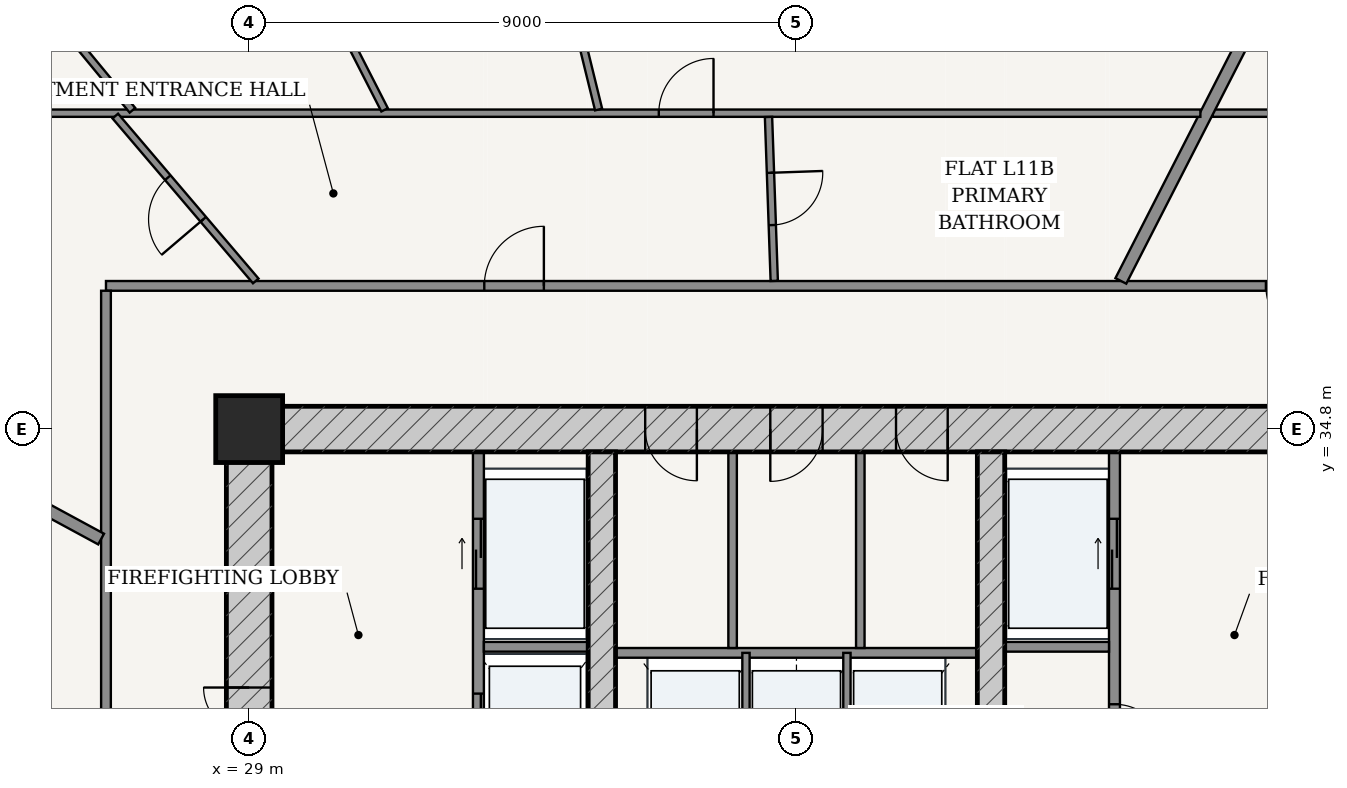
"""IFC4 building model, lengths in metres.
Left out: names, types, materials, properties, quantities, classifications, styles, units other than length and angle.
Written with IfcOpenShell. Run it as: python <this file> out.ifc"""

import sys

from ifc_helpers import new_model, si_unit, direction, frame, frame_2d, origin, origin_2d, place, context, subcontext, project, spatial, rectangle, extrude, source, transform, mapped, element, fill, save


model = new_model("IFC4")
c1 = context("Model", 3, precision=1e-05, world=origin(), true_north=direction((-0.2419218956, 0.970295726276)))
c2 = subcontext(c1, "Body", "Model", "MODEL_VIEW")
j1 = project(units=[si_unit("LENGTHUNIT", "METRE"), si_unit("PLANEANGLEUNIT", "RADIAN")], contexts=[c1])
p1 = place(None, origin())
s1 = spatial("IfcSite", under=j1, at=p1, CompositionType="ELEMENT")
p2 = place(p1, origin())
s2 = spatial("IfcBuilding", under=s1, at=p2, CompositionType="ELEMENT")
p3 = place(p2, frame((0.0, 0.0, 45.6)))
s3 = spatial("IfcBuildingStorey", under=s2, at=p3, CompositionType="ELEMENT", Elevation=45.6)
p4 = place(p3, frame((29.0, 34.8, 0.0), z_axis=(0.0, 0.0, 1.0), x_axis=(1.0, 0.0, 0.0)))
e1 = element("IfcColumn", 1, at=p4, inside=s3, PredefinedType="COLUMN", context=c2, shape_type="SweptSolid", body=[
    extrude(rectangle(XDim=1.1, YDim=1.1, at=origin_2d()), origin(), (0.0, 0.0, 1.0), 3.6),
])
p5 = place(p3, frame((28.625, 34.8, 0.0), z_axis=(0.0, 0.0, 1.0), x_axis=(1.0, 0.0, 0.0)))
e2 = element("IfcWall", 2, at=p5, inside=s3, PredefinedType="SHEAR", context=c2, shape_type="SweptSolid", body=[
    extrude(rectangle(XDim=18.75, YDim=0.75, at=frame_2d((9.375, 0.0))), origin(), (0.0, 0.0, 1.0), 3.32),
])
p6 = place(p5, frame((6.887, 0.0, 0.0)))
e3 = element("IfcOpeningElement", 3, at=p6, cuts=e2, PredefinedType="OPENING", context=c2, shape_type="SweptSolid", body=[
    extrude(rectangle(XDim=0.85, YDim=2.1, at=frame_2d((0.425, 1.05))), frame((0.0, 0.385, 0.0), z_axis=(0.0, -1.0, 0.0), x_axis=(1.0, 0.0, 0.0)), (0.0, 0.0, 1.0), 0.77),
])
p7 = place(p5, frame((8.945, 0.0, 0.0)))
e4 = element("IfcOpeningElement", 4, at=p7, cuts=e2, PredefinedType="OPENING", context=c2, shape_type="SweptSolid", body=[
    extrude(rectangle(XDim=0.86, YDim=2.1, at=frame_2d((0.43, 1.05))), frame((0.0, 0.385, 0.0), z_axis=(0.0, -1.0, 0.0), x_axis=(1.0, 0.0, 0.0)), (0.0, 0.0, 1.0), 0.77),
])
p8 = place(p5, frame((11.012, 0.0, 0.0)))
e5 = element("IfcOpeningElement", 5, at=p8, cuts=e2, PredefinedType="OPENING", context=c2, shape_type="SweptSolid", body=[
    extrude(rectangle(XDim=0.85, YDim=2.1, at=frame_2d((0.425, 1.05))), frame((0.0, 0.385, 0.0), z_axis=(0.0, -1.0, 0.0), x_axis=(1.0, 0.0, 0.0)), (0.0, 0.0, 1.0), 0.77),
])
p9 = place(p3, frame((29.0, 19.175, 0.0), z_axis=(0.0, 0.0, 1.0), x_axis=(0.0, 1.0, 0.0)))
e6 = element("IfcWall", 6, at=p9, inside=s3, PredefinedType="SHEAR", context=c2, shape_type="SweptSolid", body=[
    extrude(rectangle(XDim=15.25, YDim=0.75, at=frame_2d((7.625, 0.0))), origin(), (0.0, 0.0, 1.0), 3.32),
])
p10 = place(p9, frame((9.875, 0.0, 0.0)))
e7 = element("IfcOpeningElement", 7, at=p10, cuts=e6, PredefinedType="OPENING", context=c2, shape_type="SweptSolid", body=[
    extrude(rectangle(XDim=1.5, YDim=2.2, at=frame_2d((0.75, 1.1))), frame((0.0, 0.385, 0.0), z_axis=(0.0, -1.0, 0.0), x_axis=(1.0, 0.0, 0.0)), (0.0, 0.0, 1.0), 0.77),
])
p11 = place(p3, frame((34.8, 19.175, 0.0), z_axis=(0.0, 0.0, 1.0), x_axis=(0.0, 1.0, 0.0)))
e8 = element("IfcWall", 8, at=p11, inside=s3, PredefinedType="SHEAR", context=c2, shape_type="SweptSolid", body=[
    extrude(rectangle(XDim=15.25, YDim=0.45, at=frame_2d((7.625, 0.0))), origin(), (0.0, 0.0, 1.0), 3.32),
])
p12 = place(p11, frame((7.8, 0.0, 0.0)))
e9 = element("IfcOpeningElement", 9, at=p12, cuts=e8, PredefinedType="OPENING", context=c2, shape_type="SweptSolid", body=[
    extrude(rectangle(XDim=1.05, YDim=2.15, at=frame_2d((0.525, 1.075))), frame((0.0, 0.235, 0.0), z_axis=(0.0, -1.0, 0.0), x_axis=(1.0, 0.0, 0.0)), (0.0, 0.0, 1.0), 0.47),
])
p13 = place(p3, frame((41.2, 19.175, 0.0), z_axis=(0.0, 0.0, 1.0), x_axis=(0.0, 1.0, 0.0)))
e10 = element("IfcWall", 10, at=p13, inside=s3, PredefinedType="SHEAR", context=c2, shape_type="SweptSolid", body=[
    extrude(rectangle(XDim=15.25, YDim=0.45, at=frame_2d((7.625, 0.0))), origin(), (0.0, 0.0, 1.0), 3.32),
])
p14 = place(p13, frame((7.8, 0.0, 0.0)))
e11 = element("IfcOpeningElement", 11, at=p14, cuts=e10, PredefinedType="OPENING", context=c2, shape_type="SweptSolid", body=[
    extrude(rectangle(XDim=1.05, YDim=2.15, at=frame_2d((0.525, 1.075))), frame((0.0, 0.235, 0.0), z_axis=(0.0, -1.0, 0.0), x_axis=(1.0, 0.0, 0.0)), (0.0, 0.0, 1.0), 0.47),
])
p15 = place(p3, frame((32.77, 28.52, 0.0), z_axis=(0.0, 0.0, 1.0), x_axis=(0.0, 1.0, 0.0)))
e12 = element("IfcWall", 12, at=p15, inside=s3, PredefinedType="PARTITIONING", context=c2, shape_type="SweptSolid", body=[
    extrude(rectangle(XDim=5.905, YDim=0.18, at=frame_2d((2.953, 0.0))), origin(), (0.0, 0.0, 1.0), 3.32),
])
p16 = place(p15, frame((3.655, 0.0, 0.0)))
e13 = element("IfcOpeningElement", 13, at=p16, cuts=e12, PredefinedType="OPENING", context=c2, shape_type="SweptSolid", body=[
    extrude(rectangle(XDim=1.15, YDim=2.2, at=frame_2d((0.575, 1.1))), frame((0.0, 0.1, 0.0), z_axis=(0.0, -1.0, 0.0), x_axis=(1.0, 0.0, 0.0)), (0.0, 0.0, 1.0), 0.2),
])
p17 = place(p15, frame((0.73, 0.0, 0.0)))
e14 = element("IfcOpeningElement", 14, at=p17, cuts=e12, PredefinedType="OPENING", context=c2, shape_type="SweptSolid", body=[
    extrude(rectangle(XDim=1.2, YDim=2.25, at=frame_2d((0.6, 1.125))), frame((0.0, 0.1, 0.0), z_axis=(0.0, -1.0, 0.0), x_axis=(1.0, 0.0, 0.0)), (0.0, 0.0, 1.0), 0.2),
])
p18 = place(p3, frame((32.86, 31.22, 0.0), z_axis=(0.0, 0.0, 1.0), x_axis=(1.0, 0.0, 0.0)))
e15 = element("IfcWall", 15, at=p18, inside=s3, PredefinedType="PARTITIONING", context=c2, shape_type="SweptSolid", body=[
    extrude(rectangle(XDim=1.715, YDim=0.16, at=frame_2d((0.857, 0.0))), origin(), (0.0, 0.0, 1.0), 3.32),
])
p19 = place(p3, frame((43.23, 28.52, 0.0), z_axis=(0.0, 0.0, 1.0), x_axis=(0.0, 1.0, 0.0)))
e16 = element("IfcWall", 16, at=p19, inside=s3, PredefinedType="PARTITIONING", context=c2, shape_type="SweptSolid", body=[
    extrude(rectangle(XDim=5.905, YDim=0.18, at=frame_2d((2.953, 0.0))), origin(), (0.0, 0.0, 1.0), 3.32),
])
p20 = place(p19, frame((0.905, 0.0, 0.0)))
e17 = element("IfcOpeningElement", 17, at=p20, cuts=e16, PredefinedType="OPENING", context=c2, shape_type="SweptSolid", body=[
    extrude(rectangle(XDim=0.85, YDim=2.1, at=frame_2d((0.425, 1.05))), frame((0.0, 0.1, 0.0), z_axis=(0.0, -1.0, 0.0), x_axis=(1.0, 0.0, 0.0)), (0.0, 0.0, 1.0), 0.2),
])
p21 = place(p19, frame((3.655, 0.0, 0.0)))
e18 = element("IfcOpeningElement", 18, at=p21, cuts=e16, PredefinedType="OPENING", context=c2, shape_type="SweptSolid", body=[
    extrude(rectangle(XDim=1.15, YDim=2.2, at=frame_2d((0.575, 1.1))), frame((0.0, 0.1, 0.0), z_axis=(0.0, -1.0, 0.0), x_axis=(1.0, 0.0, 0.0)), (0.0, 0.0, 1.0), 0.2),
])
p22 = place(p3, frame((41.425, 31.22, 0.0), z_axis=(0.0, 0.0, 1.0), x_axis=(1.0, 0.0, 0.0)))
e19 = element("IfcWall", 19, at=p22, inside=s3, PredefinedType="PARTITIONING", context=c2, shape_type="SweptSolid", body=[
    extrude(rectangle(XDim=1.715, YDim=0.16, at=frame_2d((0.857, 0.0))), origin(), (0.0, 0.0, 1.0), 3.32),
])
p23 = place(p3, frame((35.025, 31.12, 0.0), z_axis=(0.0, 0.0, 1.0), x_axis=(1.0, 0.0, 0.0)))
e20 = element("IfcWall", 20, at=p23, inside=s3, PredefinedType="PARTITIONING", context=c2, shape_type="SweptSolid", body=[
    extrude(rectangle(XDim=5.95, YDim=0.16, at=frame_2d((2.975, 0.0))), origin(), (0.0, 0.0, 1.0), 3.32),
])
for number, where, z_axis, x_axis in (
    (21, (37.17, 28.56, 0.0), (0.0, 0.0, 1.0), (0.0, 1.0, 0.0)),
    (22, (38.83, 28.56, 0.0), (0.0, 0.0, 1.0), (0.0, 1.0, 0.0)),
):
    element("IfcWall", number, at=place(p3, frame(where, z_axis=z_axis, x_axis=x_axis)), inside=s3, PredefinedType="PARTITIONING", context=c2, shape_type="SweptSolid", body=[
        extrude(rectangle(XDim=2.56, YDim=0.12, at=frame_2d((1.28, 0.0))), origin(), (0.0, 0.0, 1.0), 3.32),
    ])
for number, where, z_axis, x_axis in (
    (23, (36.95, 31.2, 0.0), (0.0, 0.0, 1.0), (0.0, 1.0, 0.0)),
    (24, (39.05, 31.2, 0.0), (0.0, 0.0, 1.0), (0.0, 1.0, 0.0)),
):
    element("IfcWall", number, at=place(p3, frame(where, z_axis=z_axis, x_axis=x_axis)), inside=s3, PredefinedType="PARTITIONING", context=c2, shape_type="SweptSolid", body=[
        extrude(rectangle(XDim=3.225, YDim=0.14, at=frame_2d((1.613, 0.0))), origin(), (0.0, 0.0, 1.0), 3.32),
    ])
p24 = place(p3, frame((26.645, 37.155, 0.0), z_axis=(0.0, 0.0, 1.0), x_axis=(1.0, 0.0, 0.0)))
e25 = element("IfcWall", 25, at=p24, inside=s3, PredefinedType="PARTITIONING", context=c2, shape_type="SweptSolid", body=[
    extrude(rectangle(XDim=22.71, YDim=0.16, at=frame_2d((11.355, 0.0))), origin(), (0.0, 0.0, 1.0), 2.688),
])
p25 = place(p24, frame((19.075, 0.0, 0.0)))
e26 = element("IfcOpeningElement", 26, at=p25, cuts=e25, PredefinedType="OPENING", context=c2, shape_type="SweptSolid", body=[
    extrude(rectangle(XDim=0.98, YDim=2.2, at=frame_2d((0.49, 1.1))), frame((0.0, 0.09, 0.0), z_axis=(0.0, -1.0, 0.0), x_axis=(1.0, 0.0, 0.0)), (0.0, 0.0, 1.0), 0.18),
])
p26 = place(p24, frame((6.221, 0.0, 0.0)))
e27 = element("IfcOpeningElement", 27, at=p26, cuts=e25, PredefinedType="OPENING", context=c2, shape_type="SweptSolid", body=[
    extrude(rectangle(XDim=0.98, YDim=2.2, at=frame_2d((0.49, 1.1))), frame((0.0, 0.09, 0.0), z_axis=(0.0, -1.0, 0.0), x_axis=(1.0, 0.0, 0.0)), (0.0, 0.0, 1.0), 0.18),
])
p27 = place(p3, frame((26.645, 16.525, 0.0), z_axis=(0.0, 0.0, 1.0), x_axis=(0.0, 1.0, 0.0)))
e28 = element("IfcWall", 28, at=p27, inside=s3, PredefinedType="PARTITIONING", context=c2, shape_type="SweptSolid", body=[
    extrude(rectangle(XDim=20.55, YDim=0.16, at=frame_2d((10.275, 0.0))), origin(), (0.0, 0.0, 1.0), 2.688),
])
p28 = place(p27, frame((2.224, 0.0, 0.0)))
e29 = element("IfcOpeningElement", 29, at=p28, cuts=e28, PredefinedType="OPENING", context=c2, shape_type="SweptSolid", body=[
    extrude(rectangle(XDim=0.98, YDim=2.2, at=frame_2d((0.49, 1.1))), frame((0.0, 0.09, 0.0), z_axis=(0.0, -1.0, 0.0), x_axis=(1.0, 0.0, 0.0)), (0.0, 0.0, 1.0), 0.18),
])
p29 = place(p3, frame((44.847, 39.995, 0.0), z_axis=(0.0, 0.0, 1.0), x_axis=(1.0, 0.0, 0.0)))
e30 = element("IfcWall", 30, at=p29, inside=s3, PredefinedType="PARTITIONING", context=c2, shape_type="SweptSolid", body=[
    extrude(rectangle(XDim=7.348, YDim=0.12, at=frame_2d((3.674, 0.0))), origin(), (0.0, 0.0, 1.0), 2.688),
])
p30 = place(p29, frame((3.224, 0.0, 0.0)))
e31 = element("IfcOpeningElement", 31, at=p30, cuts=e30, PredefinedType="OPENING", context=c2, shape_type="SweptSolid", body=[
    extrude(rectangle(XDim=0.9, YDim=2.15, at=frame_2d((0.45, 1.075))), frame((0.0, 0.07, 0.0), z_axis=(0.0, -1.0, 0.0), x_axis=(1.0, 0.0, 0.0)), (0.0, 0.0, 1.0), 0.14),
])
p31 = place(p3, frame((43.335, 37.237, 0.0), z_axis=(0.0, 0.0, 1.0), x_axis=(0.455148959499, 0.890415310216, 0.0)))
e32 = element("IfcWall", 32, at=p31, inside=s3, PredefinedType="PARTITIONING", context=c2, shape_type="SweptSolid", body=[
    extrude(rectangle(XDim=12.598, YDim=0.2, at=frame_2d((6.299, 0.0))), origin(), (0.0, 0.0, 1.0), 2.762),
])
p32 = place(p3, frame((23.805, 39.995, 0.0), z_axis=(0.0, 0.0, 1.0), x_axis=(1.0, 0.0, 0.0)))
e33 = element("IfcWall", 33, at=p32, inside=s3, PredefinedType="PARTITIONING", context=c2, shape_type="SweptSolid", body=[
    extrude(rectangle(XDim=20.838, YDim=0.12, at=frame_2d((10.419, 0.0))), origin(), (0.0, 0.0, 1.0), 2.688),
])
p33 = place(p32, frame((11.931, 0.0, 0.0)))
e34 = element("IfcOpeningElement", 34, at=p33, cuts=e33, PredefinedType="OPENING", context=c2, shape_type="SweptSolid", body=[
    extrude(rectangle(XDim=0.9, YDim=2.15, at=frame_2d((0.45, 1.075))), frame((0.0, 0.07, 0.0), z_axis=(0.0, -1.0, 0.0), x_axis=(1.0, 0.0, 0.0)), (0.0, 0.0, 1.0), 0.14),
])
p34 = place(p3, frame((34.746, 40.055, 0.0), z_axis=(0.0, 0.0, 1.0), x_axis=(-0.238386209483, 0.971170435675, 0.0)))
e35 = element("IfcWall", 35, at=p34, inside=s3, PredefinedType="PARTITIONING", context=c2, shape_type="SweptSolid", body=[
    extrude(rectangle(XDim=9.973, YDim=0.12, at=frame_2d((4.987, 0.0))), origin(), (0.0, 0.0, 1.0), 2.688),
])
p35 = place(p34, frame((3.461, 0.0, 0.0)))
e36 = element("IfcOpeningElement", 36, at=p35, cuts=e35, PredefinedType="OPENING", context=c2, shape_type="SweptSolid", body=[
    extrude(rectangle(XDim=0.9, YDim=2.15, at=frame_2d((0.45, 1.075))), frame((0.0, 0.07, 0.0), z_axis=(0.0, -1.0, 0.0), x_axis=(1.0, 0.0, 0.0)), (0.0, 0.0, 1.0), 0.14),
])
p36 = place(p3, frame((31.227, 40.05, 0.0), z_axis=(0.0, 0.0, 1.0), x_axis=(-0.455142050367, 0.890418841887, 0.0)))
e37 = element("IfcWall", 37, at=p36, inside=s3, PredefinedType="PARTITIONING", context=c2, shape_type="SweptSolid", body=[
    extrude(rectangle(XDim=9.438, YDim=0.12, at=frame_2d((4.719, 0.0))), origin(), (0.0, 0.0, 1.0), 2.762),
])
p37 = place(p36, frame((4.269, 0.0, 0.0)))
e38 = element("IfcOpeningElement", 38, at=p37, cuts=e37, PredefinedType="OPENING", context=c2, shape_type="SweptSolid", body=[
    extrude(rectangle(XDim=0.9, YDim=2.15, at=frame_2d((0.45, 1.075))), frame((0.0, 0.07, 0.0), z_axis=(0.0, -1.0, 0.0), x_axis=(1.0, 0.0, 0.0)), (0.0, 0.0, 1.0), 0.14),
])
p38 = place(p3, frame((27.081, 40.043, 0.0), z_axis=(0.0, 0.0, 1.0), x_axis=(-0.636193310573, 0.771529695852, 0.0)))
e39 = element("IfcWall", 39, at=p38, inside=s3, PredefinedType="PARTITIONING", context=c2, shape_type="SweptSolid", body=[
    extrude(rectangle(XDim=8.044, YDim=0.12, at=frame_2d((4.022, 0.0))), origin(), (0.0, 0.0, 1.0), 2.688),
])
p39 = place(p3, frame((37.635, 37.237, 0.0), z_axis=(0.0, 0.0, 1.0), x_axis=(-0.03493293564, 0.999389658746, 0.0)))
e40 = element("IfcWall", 40, at=p39, inside=s3, PredefinedType="PARTITIONING", context=c2, shape_type="SweptSolid", body=[
    extrude(rectangle(XDim=2.698, YDim=0.12, at=frame_2d((1.349, 0.0))), origin(), (0.0, 0.0, 1.0), 3.32),
])
p40 = place(p39, frame((0.919, 0.0, 0.0)))
e41 = element("IfcOpeningElement", 41, at=p40, cuts=e40, PredefinedType="OPENING", context=c2, shape_type="SweptSolid", body=[
    extrude(rectangle(XDim=0.86, YDim=2.15, at=frame_2d((0.43, 1.075))), frame((0.0, 0.07, 0.0), z_axis=(0.0, -1.0, 0.0), x_axis=(1.0, 0.0, 0.0)), (0.0, 0.0, 1.0), 0.14),
])
p41 = place(p3, frame((29.108, 37.237, 0.0), z_axis=(0.0, 0.0, 1.0), x_axis=(-0.648553247009, 0.761169288526, 0.0)))
e42 = element("IfcWall", 42, at=p41, inside=s3, PredefinedType="PARTITIONING", context=c2, shape_type="SweptSolid", body=[
    extrude(rectangle(XDim=3.562, YDim=0.12, at=frame_2d((1.781, 0.0))), origin(), (0.0, 0.0, 1.0), 2.999),
])
p42 = place(p41, frame((1.331, 0.0, 0.0)))
e43 = element("IfcOpeningElement", 43, at=p42, cuts=e42, PredefinedType="OPENING", context=c2, shape_type="SweptSolid", body=[
    extrude(rectangle(XDim=0.9, YDim=2.15, at=frame_2d((0.45, 1.075))), frame((0.0, 0.07, 0.0), z_axis=(0.0, -1.0, 0.0), x_axis=(1.0, 0.0, 0.0)), (0.0, 0.0, 1.0), 0.14),
])
p43 = place(p3, frame((26.565, 32.991, 0.0), z_axis=(0.0, 0.0, 1.0), x_axis=(-0.879369737803, 0.476139542819, 0.0)))
e44 = element("IfcWall", 44, at=p43, inside=s3, PredefinedType="PARTITIONING", context=c2, shape_type="SweptSolid", body=[
    extrude(rectangle(XDim=14.295, YDim=0.2, at=frame_2d((7.147, 0.0))), origin(), (0.0, 0.0, 1.0), 2.688),
])
m1 = source(origin(), c2, "Body", "SweptSolid", [
    extrude(rectangle(XDim=1.5, YDim=2.2, at=frame_2d((0.75, 1.1))), frame((0.0, 0.025, 0.0), z_axis=(0.0, -1.0, 0.0), x_axis=(1.0, 0.0, 0.0)), (0.0, 0.0, 1.0), 0.05),
])
p44 = place(p10, origin())
e45 = element("IfcDoor", 45, at=p44, inside=s3, OperationType="DOUBLE_DOOR_SINGLE_SWING", PredefinedType="DOOR", context=c2, shape_type="MappedRepresentation", body=[
    mapped(m1, transform((0.0, 0.0, 0.0), scale=1.0)),
])
fill(e7, e45)
m2 = source(origin(), c2, "Body", "SweptSolid", [
    extrude(rectangle(XDim=0.85, YDim=2.1, at=frame_2d((0.425, 1.05))), frame((0.0, 0.025, 0.0), z_axis=(0.0, -1.0, 0.0), x_axis=(1.0, 0.0, 0.0)), (0.0, 0.0, 1.0), 0.05),
])
p45 = place(p20, frame((0.85, 0.0, 0.0), z_axis=(0.0, 0.0, 1.0), x_axis=(-1.0, 0.0, 0.0)))
e46 = element("IfcDoor", 46, at=p45, inside=s3, OperationType="SINGLE_SWING_RIGHT", PredefinedType="DOOR", context=c2, shape_type="MappedRepresentation", body=[
    mapped(m2, transform((0.0, 0.0, 0.0), scale=1.0)),
])
fill(e17, e46)
p46 = place(p6, frame((0.85, 0.0, 0.0), z_axis=(0.0, 0.0, 1.0), x_axis=(-1.0, 0.0, 0.0)))
e47 = element("IfcDoor", 47, at=p46, inside=s3, OperationType="SINGLE_SWING_LEFT", PredefinedType="DOOR", context=c2, shape_type="MappedRepresentation", body=[
    mapped(m2, transform((0.0, 0.0, 0.0), scale=1.0)),
])
fill(e3, e47)
m3 = source(origin(), c2, "Body", "SweptSolid", [
    extrude(rectangle(XDim=0.86, YDim=2.1, at=frame_2d((0.43, 1.05))), frame((0.0, 0.025, 0.0), z_axis=(0.0, -1.0, 0.0), x_axis=(1.0, 0.0, 0.0)), (0.0, 0.0, 1.0), 0.05),
])
p47 = place(p7, frame((0.86, 0.0, 0.0), z_axis=(0.0, 0.0, 1.0), x_axis=(-1.0, 0.0, 0.0)))
e48 = element("IfcDoor", 48, at=p47, inside=s3, OperationType="SINGLE_SWING_RIGHT", PredefinedType="DOOR", context=c2, shape_type="MappedRepresentation", body=[
    mapped(m3, transform((0.0, 0.0, 0.0), scale=1.0)),
])
fill(e4, e48)
p48 = place(p8, frame((0.85, 0.0, 0.0), z_axis=(0.0, 0.0, 1.0), x_axis=(-1.0, 0.0, 0.0)))
e49 = element("IfcDoor", 49, at=p48, inside=s3, OperationType="SINGLE_SWING_LEFT", PredefinedType="DOOR", context=c2, shape_type="MappedRepresentation", body=[
    mapped(m2, transform((0.0, 0.0, 0.0), scale=1.0)),
])
fill(e5, e49)
m4 = source(origin(), c2, "Body", "SweptSolid", [
    extrude(rectangle(XDim=1.15, YDim=2.2, at=frame_2d((0.575, 1.1))), frame((0.0, 0.025, 0.0), z_axis=(0.0, -1.0, 0.0), x_axis=(1.0, 0.0, 0.0)), (0.0, 0.0, 1.0), 0.05),
])
p49 = place(p16, origin())
e50 = element("IfcDoor", 50, at=p49, inside=s3, OperationType="DOUBLE_DOOR_SLIDING", PredefinedType="DOOR", context=c2, shape_type="MappedRepresentation", body=[
    mapped(m4, transform((0.0, 0.0, 0.0), scale=1.0)),
])
fill(e13, e50)
p50 = place(p21, origin())
e51 = element("IfcDoor", 51, at=p50, inside=s3, OperationType="DOUBLE_DOOR_SLIDING", PredefinedType="DOOR", context=c2, shape_type="MappedRepresentation", body=[
    mapped(m4, transform((0.0, 0.0, 0.0), scale=1.0)),
])
fill(e18, e51)
m5 = source(origin(), c2, "Body", "SweptSolid", [
    extrude(rectangle(XDim=1.2, YDim=2.25, at=frame_2d((0.6, 1.125))), frame((0.0, 0.025, 0.0), z_axis=(0.0, -1.0, 0.0), x_axis=(1.0, 0.0, 0.0)), (0.0, 0.0, 1.0), 0.05),
])
p51 = place(p17, origin())
e52 = element("IfcDoor", 52, at=p51, inside=s3, OperationType="DOUBLE_DOOR_SLIDING", PredefinedType="DOOR", context=c2, shape_type="MappedRepresentation", body=[
    mapped(m5, transform((0.0, 0.0, 0.0), scale=1.0)),
])
fill(e14, e52)
m6 = source(origin(), c2, "Body", "SweptSolid", [
    extrude(rectangle(XDim=0.98, YDim=2.2, at=frame_2d((0.49, 1.1))), frame((0.0, 0.025, 0.0), z_axis=(0.0, -1.0, 0.0), x_axis=(1.0, 0.0, 0.0)), (0.0, 0.0, 1.0), 0.05),
])
p52 = place(p25, frame((0.98, 0.0, 0.0), z_axis=(0.0, 0.0, 1.0), x_axis=(-1.0, 0.0, 0.0)))
e53 = element("IfcDoor", 53, at=p52, inside=s3, OperationType="SINGLE_SWING_LEFT", PredefinedType="DOOR", context=c2, shape_type="MappedRepresentation", body=[
    mapped(m6, transform((0.0, 0.0, 0.0), scale=1.0)),
])
fill(e26, e53)
p53 = place(p26, origin())
e54 = element("IfcDoor", 54, at=p53, inside=s3, OperationType="SINGLE_SWING_RIGHT", PredefinedType="DOOR", context=c2, shape_type="MappedRepresentation", body=[
    mapped(m6, transform((0.0, 0.0, 0.0), scale=1.0)),
])
fill(e27, e54)
m7 = source(origin(), c2, "Body", "SweptSolid", [
    extrude(rectangle(XDim=0.86, YDim=2.15, at=frame_2d((0.43, 1.075))), frame((0.0, 0.025, 0.0), z_axis=(0.0, -1.0, 0.0), x_axis=(1.0, 0.0, 0.0)), (0.0, 0.0, 1.0), 0.05),
])
p54 = place(p40, frame((0.86, 0.0, 0.0), z_axis=(0.0, 0.0, 1.0), x_axis=(-1.0, 0.0, 0.0)))
e55 = element("IfcDoor", 55, at=p54, inside=s3, OperationType="SINGLE_SWING_LEFT", PredefinedType="DOOR", context=c2, shape_type="MappedRepresentation", body=[
    mapped(m7, transform((0.0, 0.0, 0.0), scale=1.0)),
])
fill(e41, e55)
m8 = source(origin(), c2, "Body", "SweptSolid", [
    extrude(rectangle(XDim=0.9, YDim=2.15, at=frame_2d((0.45, 1.075))), frame((0.0, 0.025, 0.0), z_axis=(0.0, -1.0, 0.0), x_axis=(1.0, 0.0, 0.0)), (0.0, 0.0, 1.0), 0.05),
])
p55 = place(p33, origin())
e56 = element("IfcDoor", 56, at=p55, inside=s3, OperationType="SINGLE_SWING_RIGHT", PredefinedType="DOOR", context=c2, shape_type="MappedRepresentation", body=[
    mapped(m8, transform((0.0, 0.0, 0.0), scale=1.0)),
])
fill(e34, e56)
p56 = place(p42, origin())
e57 = element("IfcDoor", 57, at=p56, inside=s3, OperationType="SINGLE_SWING_LEFT", PredefinedType="DOOR", context=c2, shape_type="MappedRepresentation", body=[
    mapped(m8, transform((0.0, 0.0, 0.0), scale=1.0)),
])
fill(e43, e57)
save(model, sys.argv[1])
